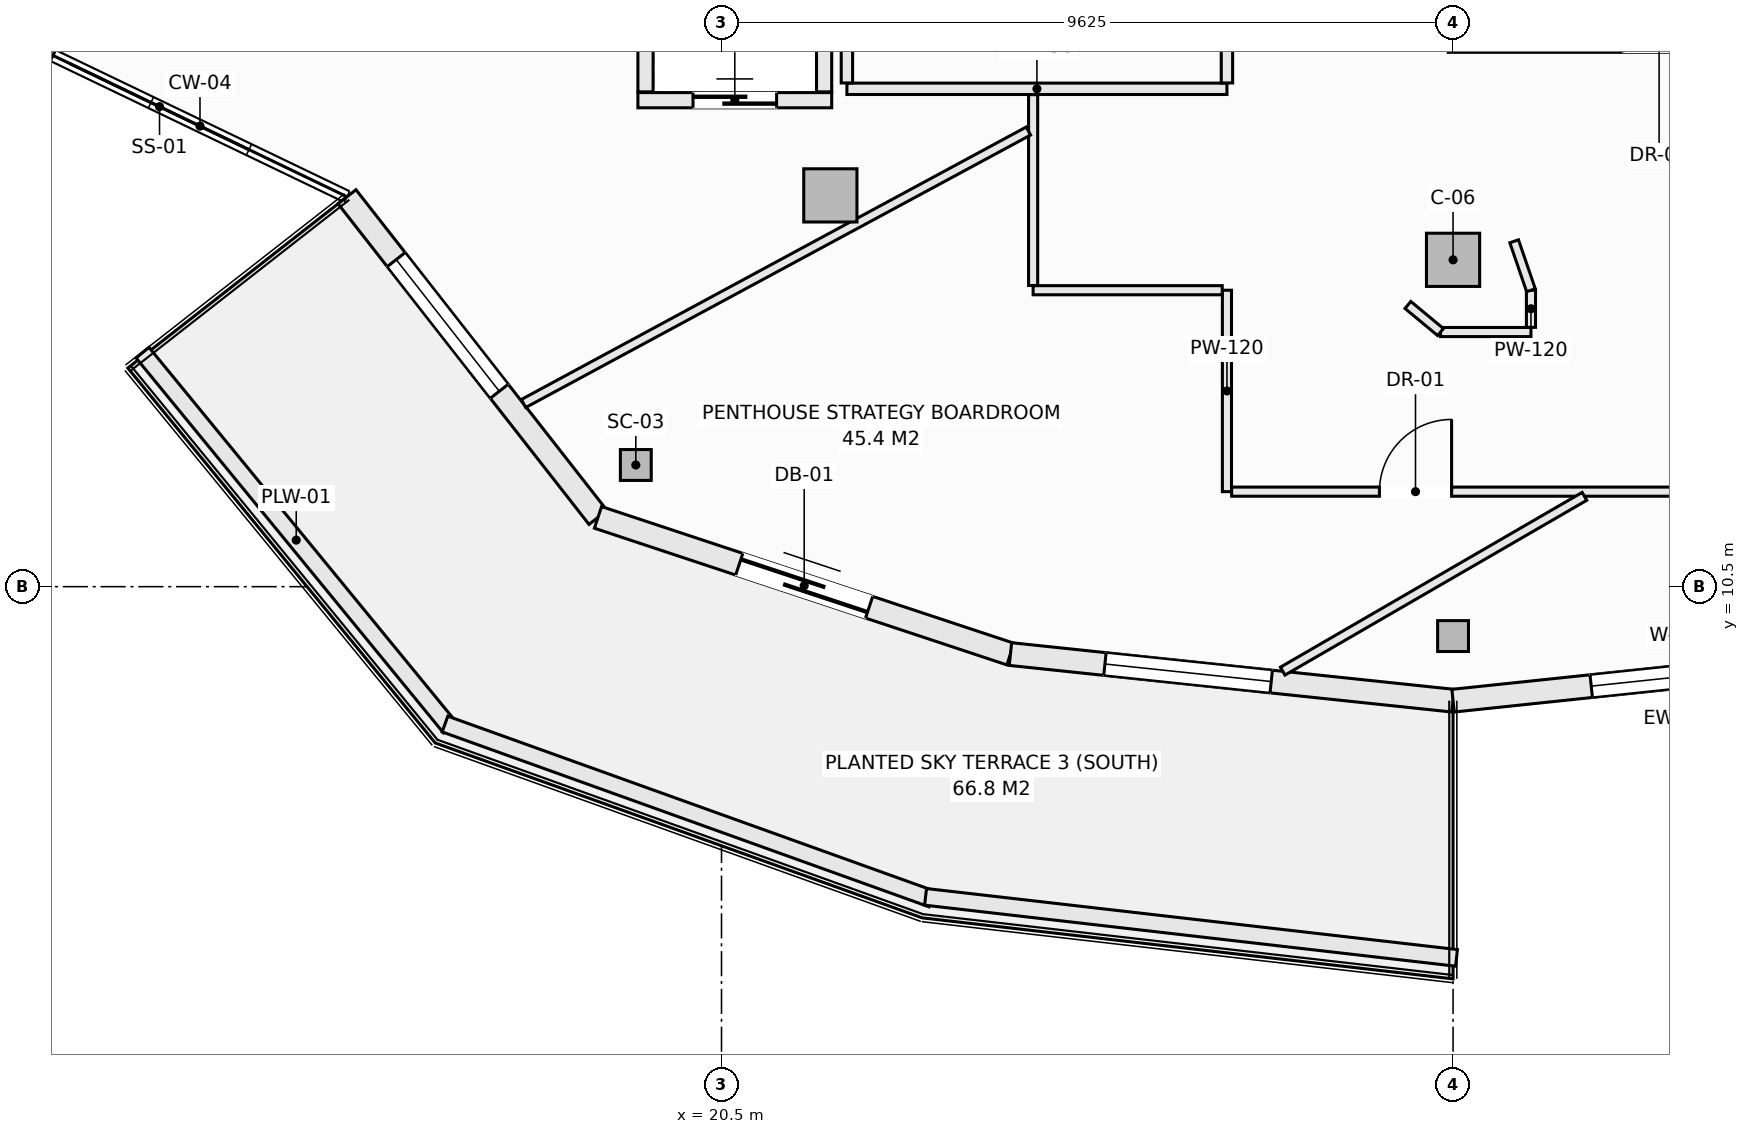
"""IFC4 building model, lengths in metres.
Left out: names, types, materials, properties, quantities, classifications, styles, units other than length and angle.
Written with IfcOpenShell. Run it as: python <this file> out.ifc"""

import sys

from ifc_helpers import new_model, si_unit, direction, frame, frame_2d, origin, origin_2d, place, context, subcontext, project, spatial, rectangle, hollow_rectangle, extrude, element, fill, save


model = new_model("IFC4")
c1 = context("Model", 3, precision=1e-05, world=origin(), true_north=direction((0.0, 1.0)))
c2 = subcontext(c1, "Body", "Model", "MODEL_VIEW")
j1 = project(units=[si_unit("LENGTHUNIT", "METRE"), si_unit("PLANEANGLEUNIT", "RADIAN")], contexts=[c1])
p1 = place(None, origin())
s1 = spatial("IfcSite", under=j1, at=p1, CompositionType="ELEMENT")
p2 = place(p1, origin())
s2 = spatial("IfcBuilding", under=s1, at=p2, CompositionType="ELEMENT")
p3 = place(p2, frame((0.0, 0.0, 252.5)))
s3 = spatial("IfcBuildingStorey", under=s2, at=p3, CompositionType="ELEMENT", Elevation=252.5)
for number, where, z_axis, x_axis in (
    (1, (19.372, 12.101, -0.27), (0.0, 0.0, 1.0), (1.0, 0.0, 0.0)),
    (2, (30.125, 9.85, -0.27), (0.0, 0.0, 1.0), (1.0, 0.0, 0.0)),
):
    element("IfcColumn", number, at=place(p3, frame(where, z_axis=z_axis, x_axis=x_axis)), inside=s3, PredefinedType="COLUMN", context=c2, shape_type="SweptSolid", body=[
        extrude(hollow_rectangle(XDim=0.406, YDim=0.406, WallThickness=0.016, at=origin_2d()), origin(), (0.0, 0.0, 1.0), 3.3),
    ])
for number, where, z_axis, x_axis in (
    (3, (21.932, 15.648, -0.27), (0.0, 0.0, 1.0), (1.0, 0.0, 0.0)),
    (4, (30.125, 14.8, -0.27), (0.0, 0.0, 1.0), (1.0, 0.0, 0.0)),
):
    element("IfcColumn", number, at=place(p3, frame(where, z_axis=z_axis, x_axis=x_axis)), inside=s3, PredefinedType="COLUMN", context=c2, shape_type="SweptSolid", body=[
        extrude(rectangle(XDim=0.7, YDim=0.7, at=origin_2d()), origin(), (0.0, 0.0, 1.0), 3.3),
    ])
p4 = place(p3, frame((10.639, 18.0, 0.0), z_axis=(0.0, 0.0, 1.0), x_axis=(0.901345553578, -0.433100673107, 0.0)))
e5 = element("IfcWall", 5, at=p4, inside=s3, PredefinedType="SOLIDWALL", context=c2, shape_type="SweptSolid", body=[
    extrude(rectangle(XDim=1.181, YDim=0.22, at=frame_2d((0.59, 0.0))), origin(), (0.0, 0.0, 1.0), 2.605),
])
p5 = place(p3, frame((15.573, 15.63, 0.0), z_axis=(0.0, 0.0, 1.0), x_axis=(0.61644588519, -0.787397276241, 0.0)))
e6 = element("IfcWall", 6, at=p5, inside=s3, PredefinedType="SOLIDWALL", context=c2, shape_type="SweptSolid", body=[
    extrude(rectangle(XDim=5.357, YDim=0.3, at=frame_2d((2.678, 0.0))), origin(), (0.0, 0.0, 1.0), 2.605),
])
p6 = place(p5, frame((1.05, 0.0, 0.72)))
e7 = element("IfcOpeningElement", 7, at=p6, cuts=e6, PredefinedType="OPENING", context=c2, shape_type="SweptSolid", body=[
    extrude(rectangle(XDim=2.2, YDim=1.65, at=frame_2d((1.1, 0.825))), frame((0.0, 0.16, 0.0), z_axis=(0.0, -1.0, 0.0), x_axis=(1.0, 0.0, 0.0)), (0.0, 0.0, 1.0), 0.32),
])
p7 = place(p3, frame((18.875, 11.412, 0.0), z_axis=(0.0, 0.0, 1.0), x_axis=(0.949232769585, -0.314574552605, 0.0)))
e8 = element("IfcWall", 8, at=p7, inside=s3, PredefinedType="SOLIDWALL", context=c2, shape_type="SweptSolid", body=[
    extrude(rectangle(XDim=5.717, YDim=0.3, at=frame_2d((2.858, 0.0))), origin(), (0.0, 0.0, 1.0), 2.605),
])
p8 = place(p7, frame((1.958, 0.0, 0.0)))
e9 = element("IfcOpeningElement", 9, at=p8, cuts=e8, PredefinedType="OPENING", context=c2, shape_type="SweptSolid", body=[
    extrude(rectangle(XDim=1.8, YDim=2.25, at=frame_2d((0.9, 1.125))), frame((0.0, 0.16, 0.0), z_axis=(0.0, -1.0, 0.0), x_axis=(1.0, 0.0, 0.0)), (0.0, 0.0, 1.0), 0.32),
])
p9 = place(p3, frame((24.302, 9.613, 0.0), z_axis=(0.0, 0.0, 1.0), x_axis=(0.994500425783, -0.10473253132, 0.0)))
e10 = element("IfcWall", 10, at=p9, inside=s3, PredefinedType="SOLIDWALL", context=c2, shape_type="SweptSolid", body=[
    extrude(rectangle(XDim=5.856, YDim=0.3, at=frame_2d((2.928, 0.0))), origin(), (0.0, 0.0, 1.0), 2.605),
])
p10 = place(p9, frame((1.25, 0.0, 0.72)))
e11 = element("IfcOpeningElement", 11, at=p10, cuts=e10, PredefinedType="OPENING", context=c2, shape_type="SweptSolid", body=[
    extrude(rectangle(XDim=2.2, YDim=1.65, at=frame_2d((1.1, 0.825))), frame((0.0, 0.16, 0.0), z_axis=(0.0, -1.0, 0.0), x_axis=(1.0, 0.0, 0.0)), (0.0, 0.0, 1.0), 0.32),
])
p11 = place(p3, frame((30.125, 9.0, 0.0), z_axis=(0.0, 0.0, 1.0), x_axis=(0.994500425783, 0.10473253132, 0.0)))
e12 = element("IfcWall", 12, at=p11, inside=s3, PredefinedType="SOLIDWALL", context=c2, shape_type="SweptSolid", body=[
    extrude(rectangle(XDim=5.856, YDim=0.3, at=frame_2d((2.928, 0.0))), origin(), (0.0, 0.0, 1.0), 2.605),
])
p12 = place(p11, frame((1.828, 0.0, 0.72)))
e13 = element("IfcOpeningElement", 13, at=p12, cuts=e12, PredefinedType="OPENING", context=c2, shape_type="SweptSolid", body=[
    extrude(rectangle(XDim=2.2, YDim=1.65, at=frame_2d((1.1, 0.825))), frame((0.0, 0.16, 0.0), z_axis=(0.0, -1.0, 0.0), x_axis=(1.0, 0.0, 0.0)), (0.0, 0.0, 1.0), 0.32),
])
p13 = place(p3, frame((12.882, 13.579, 0.0), z_axis=(0.0, 0.0, 1.0), x_axis=(0.63407318032, -0.77327304492, 0.0)))
e14 = element("IfcWall", 14, at=p13, inside=s3, PredefinedType="PARAPET", context=c2, shape_type="SweptSolid", body=[
    extrude(rectangle(XDim=6.379, YDim=0.22, at=frame_2d((3.189, 0.0))), origin(), (0.0, 0.0, 1.0), 0.52),
])
p14 = place(p3, frame((16.862, 8.692, 0.0), z_axis=(0.0, 0.0, 1.0), x_axis=(0.941139090914, -0.338019543152, 0.0)))
e15 = element("IfcWall", 15, at=p14, inside=s3, PredefinedType="PARAPET", context=c2, shape_type="SweptSolid", body=[
    extrude(rectangle(XDim=6.807, YDim=0.22, at=frame_2d((3.403, 0.0))), origin(), (0.0, 0.0, 1.0), 0.52),
])
p15 = place(p3, frame((23.185, 6.419, 0.0), z_axis=(0.0, 0.0, 1.0), x_axis=(0.993458716016, -0.114191854231, 0.0)))
e16 = element("IfcWall", 16, at=p15, inside=s3, PredefinedType="PARAPET", context=c2, shape_type="SweptSolid", body=[
    extrude(rectangle(XDim=7.032, YDim=0.22, at=frame_2d((3.516, 0.0))), origin(), (0.0, 0.0, 1.0), 0.52),
])
p16 = place(p3, frame((19.4, 16.9, 0.0), z_axis=(0.0, 0.0, 1.0), x_axis=(1.0, 0.0, 0.0)))
e17 = element("IfcWall", 17, at=p16, inside=s3, PredefinedType="SOLIDWALL", context=c2, shape_type="SweptSolid", body=[
    extrude(rectangle(XDim=2.55, YDim=0.2, at=frame_2d((1.275, 0.0))), origin(), (0.0, 0.0, 1.0), 3.03),
])
p17 = place(p16, frame((0.725, 0.0, 0.0)))
e18 = element("IfcOpeningElement", 18, at=p17, cuts=e17, PredefinedType="OPENING", context=c2, shape_type="SweptSolid", body=[
    extrude(rectangle(XDim=1.1, YDim=2.2, at=frame_2d((0.55, 1.1))), frame((0.0, 0.11, 0.0), z_axis=(0.0, -1.0, 0.0), x_axis=(1.0, 0.0, 0.0)), (0.0, 0.0, 1.0), 0.22),
])
for number, where, z_axis, x_axis in (
    (19, (19.5, 17.01, 0.0), (0.0, 0.0, 1.0), (0.0, 1.0, 0.0)),
    (20, (21.85, 17.01, 0.0), (0.0, 0.0, 1.0), (0.0, 1.0, 0.0)),
):
    element("IfcWall", number, at=place(p3, frame(where, z_axis=z_axis, x_axis=x_axis)), inside=s3, PredefinedType="SOLIDWALL", context=c2, shape_type="SweptSolid", body=[
        extrude(rectangle(XDim=2.53, YDim=0.2, at=frame_2d((1.265, 0.0))), origin(), (0.0, 0.0, 1.0), 3.03),
    ])
p18 = place(p3, frame((22.15, 17.05, 0.0), z_axis=(0.0, 0.0, 1.0), x_axis=(1.0, 0.0, 0.0)))
e21 = element("IfcWall", 21, at=p18, inside=s3, PredefinedType="PARTITIONING", context=c2, shape_type="SweptSolid", body=[
    extrude(rectangle(XDim=5.0, YDim=0.15, at=frame_2d((2.5, 0.0))), origin(), (0.0, 0.0, 1.0), 3.03),
])
p19 = place(p3, frame((22.15, 17.127, 0.0), z_axis=(0.0, 0.0, 1.0), x_axis=(0.0, 1.0, 0.0)))
e22 = element("IfcWall", 22, at=p19, inside=s3, PredefinedType="PARTITIONING", context=c2, shape_type="SweptSolid", body=[
    extrude(rectangle(XDim=2.823, YDim=0.15, at=frame_2d((1.412, 0.0))), origin(), (0.0, 0.0, 1.0), 3.03),
])
p20 = place(p3, frame((27.15, 11.75, 0.0), z_axis=(0.0, 0.0, 1.0), x_axis=(0.0, 1.0, 0.0)))
e23 = element("IfcWall", 23, at=p20, inside=s3, PredefinedType="PARTITIONING", context=c2, shape_type="SweptSolid", body=[
    extrude(rectangle(XDim=2.65, YDim=0.12, at=frame_2d((1.325, 0.0))), origin(), (0.0, 0.0, 1.0), 3.03),
])
p21 = place(p3, frame((27.15, 17.127, 0.0), z_axis=(0.0, 0.0, 1.0), x_axis=(0.0, 1.0, 0.0)))
e24 = element("IfcWall", 24, at=p21, inside=s3, PredefinedType="PARTITIONING", context=c2, shape_type="SweptSolid", body=[
    extrude(rectangle(XDim=2.871, YDim=0.15, at=frame_2d((1.436, 0.0))), origin(), (0.0, 0.0, 1.0), 3.03),
])
p22 = place(p21, frame((0.96, 0.0, 0.0)))
e25 = element("IfcOpeningElement", 25, at=p22, cuts=e24, PredefinedType="OPENING", context=c2, shape_type="SweptSolid", body=[
    extrude(rectangle(XDim=0.95, YDim=2.1, at=frame_2d((0.475, 1.05))), frame((0.0, 0.085, 0.0), z_axis=(0.0, -1.0, 0.0), x_axis=(1.0, 0.0, 0.0)), (0.0, 0.0, 1.0), 0.17),
])
p23 = place(p3, frame((24.6, 14.4, 0.0), z_axis=(0.0, 0.0, 1.0), x_axis=(1.0, 0.0, 0.0)))
e26 = element("IfcWall", 26, at=p23, inside=s3, PredefinedType="PARTITIONING", context=c2, shape_type="SweptSolid", body=[
    extrude(rectangle(XDim=2.488, YDim=0.12, at=frame_2d((1.244, 0.0))), origin(), (0.0, 0.0, 1.0), 3.03),
])
p24 = place(p3, frame((27.212, 11.75, 0.0), z_axis=(0.0, 0.0, 1.0), x_axis=(1.0, 0.0, 0.0)))
e27 = element("IfcWall", 27, at=p24, inside=s3, PredefinedType="PARTITIONING", context=c2, shape_type="SweptSolid", body=[
    extrude(rectangle(XDim=7.256, YDim=0.12, at=frame_2d((3.628, 0.0))), origin(), (0.0, 0.0, 1.0), 3.03),
])
p25 = place(p24, frame((1.944, 0.0, 0.0)))
e28 = element("IfcOpeningElement", 28, at=p25, cuts=e27, PredefinedType="OPENING", context=c2, shape_type="SweptSolid", body=[
    extrude(rectangle(XDim=0.95, YDim=2.1, at=frame_2d((0.475, 1.05))), frame((0.0, 0.07, 0.0), z_axis=(0.0, -1.0, 0.0), x_axis=(1.0, 0.0, 0.0)), (0.0, 0.0, 1.0), 0.14),
])
p26 = place(p3, frame((24.6, 14.462, 0.0), z_axis=(0.0, 0.0, 1.0), x_axis=(0.0, 1.0, 0.0)))
e29 = element("IfcWall", 29, at=p26, inside=s3, PredefinedType="PARTITIONING", context=c2, shape_type="SweptSolid", body=[
    extrude(rectangle(XDim=2.511, YDim=0.12, at=frame_2d((1.255, 0.0))), origin(), (0.0, 0.0, 1.0), 3.03),
])
p27 = place(p3, frame((29.96, 13.85, 0.0), z_axis=(0.0, 0.0, 1.0), x_axis=(1.0, 0.0, 0.0)))
e30 = element("IfcWall", 30, at=p27, inside=s3, PredefinedType="PARTITIONING", context=c2, shape_type="SweptSolid", body=[
    extrude(rectangle(XDim=1.19, YDim=0.12, at=frame_2d((0.595, 0.0))), origin(), (0.0, 0.0, 1.0), 3.03),
])
p28 = place(p3, frame((31.15, 13.912, 0.0), z_axis=(0.0, 0.0, 1.0), x_axis=(0.0, 1.0, 0.0)))
e31 = element("IfcWall", 31, at=p28, inside=s3, PredefinedType="PARTITIONING", context=c2, shape_type="SweptSolid", body=[
    extrude(rectangle(XDim=0.488, YDim=0.12, at=frame_2d((0.244, 0.0))), origin(), (0.0, 0.0, 1.0), 3.03),
])
p29 = place(p3, frame((30.929, 15.044, 0.0), z_axis=(0.0, 0.0, 1.0), x_axis=(0.324498492416, -0.945886213252, 0.0)))
e32 = element("IfcWall", 32, at=p29, inside=s3, PredefinedType="PARTITIONING", context=c2, shape_type="SweptSolid", body=[
    extrude(rectangle(XDim=0.681, YDim=0.12, at=frame_2d((0.34, 0.0))), origin(), (0.0, 0.0, 1.0), 3.03),
])
p30 = place(p3, frame((29.531, 14.206, 0.0), z_axis=(0.0, 0.0, 1.0), x_axis=(0.7695479554, -0.638589026166, 0.0)))
e33 = element("IfcWall", 33, at=p30, inside=s3, PredefinedType="PARTITIONING", context=c2, shape_type="SweptSolid", body=[
    extrude(rectangle(XDim=0.557, YDim=0.12, at=frame_2d((0.279, 0.0))), origin(), (0.0, 0.0, 1.0), 3.03),
])
p31 = place(p3, frame((17.895, 12.91, 0.0), z_axis=(0.0, 0.0, 1.0), x_axis=(0.880038694226, 0.474901986377, 0.0)))
e34 = element("IfcWall", 34, at=p31, inside=s3, PredefinedType="PARTITIONING", context=c2, shape_type="SweptSolid", body=[
    extrude(rectangle(XDim=7.548, YDim=0.12, at=frame_2d((3.774, 0.0))), origin(), (0.0, 0.0, 1.0), 2.478),
])
p32 = place(p3, frame((27.884, 9.389, 0.0), z_axis=(0.0, 0.0, 1.0), x_axis=(0.865363124713, 0.501145350558, 0.0)))
e35 = element("IfcWall", 35, at=p32, inside=s3, PredefinedType="PARTITIONING", context=c2, shape_type="SweptSolid", body=[
    extrude(rectangle(XDim=4.588, YDim=0.12, at=frame_2d((2.294, 0.0))), origin(), (0.0, 0.0, 1.0), 3.03),
])
p33 = place(p6, origin())
e36 = element("IfcWindow", 36, at=p33, inside=s3, PartitioningType="SINGLE_PANEL", PredefinedType="WINDOW", context=c2, shape_type="SweptSolid", body=[
    extrude(rectangle(XDim=2.2, YDim=1.65, at=frame_2d((1.1, 0.825))), frame((0.0, 0.03, 0.0), z_axis=(0.0, -1.0, 0.0), x_axis=(1.0, 0.0, 0.0)), (0.0, 0.0, 1.0), 0.06),
])
fill(e7, e36)
p34 = place(p8, frame((1.8, 0.0, 0.0), z_axis=(0.0, 0.0, 1.0), x_axis=(-1.0, 0.0, 0.0)))
e37 = element("IfcDoor", 37, at=p34, inside=s3, OperationType="SLIDING_TO_LEFT", PredefinedType="DOOR", context=c2, shape_type="SweptSolid", body=[
    extrude(rectangle(XDim=1.8, YDim=2.25, at=frame_2d((0.9, 1.125))), frame((0.0, 0.025, 0.0), z_axis=(0.0, -1.0, 0.0), x_axis=(1.0, 0.0, 0.0)), (0.0, 0.0, 1.0), 0.05),
])
fill(e9, e37)
p35 = place(p10, origin())
e38 = element("IfcWindow", 38, at=p35, inside=s3, PartitioningType="SINGLE_PANEL", PredefinedType="WINDOW", context=c2, shape_type="SweptSolid", body=[
    extrude(rectangle(XDim=2.2, YDim=1.65, at=frame_2d((1.1, 0.825))), frame((0.0, 0.03, 0.0), z_axis=(0.0, -1.0, 0.0), x_axis=(1.0, 0.0, 0.0)), (0.0, 0.0, 1.0), 0.06),
])
fill(e11, e38)
p36 = place(p12, origin())
e39 = element("IfcWindow", 39, at=p36, inside=s3, PartitioningType="SINGLE_PANEL", PredefinedType="WINDOW", context=c2, shape_type="SweptSolid", body=[
    extrude(rectangle(XDim=2.2, YDim=1.65, at=frame_2d((1.1, 0.825))), frame((0.0, 0.03, 0.0), z_axis=(0.0, -1.0, 0.0), x_axis=(1.0, 0.0, 0.0)), (0.0, 0.0, 1.0), 0.06),
])
fill(e13, e39)
p37 = place(p17, origin())
e40 = element("IfcDoor", 40, at=p37, inside=s3, OperationType="SLIDING_TO_LEFT", PredefinedType="DOOR", context=c2, shape_type="SweptSolid", body=[
    extrude(rectangle(XDim=1.1, YDim=2.2, at=frame_2d((0.55, 1.1))), frame((0.0, 0.025, 0.0), z_axis=(0.0, -1.0, 0.0), x_axis=(1.0, 0.0, 0.0)), (0.0, 0.0, 1.0), 0.05),
])
fill(e18, e40)
p38 = place(p25, origin())
e41 = element("IfcDoor", 41, at=p38, inside=s3, OperationType="SINGLE_SWING_RIGHT", PredefinedType="DOOR", context=c2, shape_type="SweptSolid", body=[
    extrude(rectangle(XDim=0.95, YDim=2.1, at=frame_2d((0.475, 1.05))), frame((0.0, 0.025, 0.0), z_axis=(0.0, -1.0, 0.0), x_axis=(1.0, 0.0, 0.0)), (0.0, 0.0, 1.0), 0.05),
])
fill(e28, e41)
save(model, sys.argv[1])
